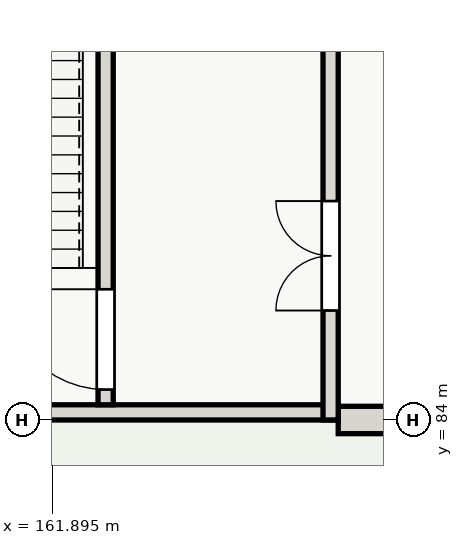
"""IFC4 building model, lengths in metres.
Left out: names, types, materials, properties, quantities, classifications, styles, units other than length and angle.
Written with IfcOpenShell. Run it as: python <this file> out.ifc"""

import sys

from ifc_helpers import new_model, si_unit, direction, frame, frame_2d, origin, place, context, subcontext, project, spatial, rectangle, extrude, element, fill, save


model = new_model("IFC4")
c1 = context("Model", 3, precision=1e-05, world=origin(), true_north=direction((0.0, 1.0)))
c2 = subcontext(c1, "Body", "Model", "MODEL_VIEW")
j1 = project(units=[si_unit("LENGTHUNIT", "METRE"), si_unit("PLANEANGLEUNIT", "RADIAN")], contexts=[c1])
p1 = place(None, origin())
s1 = spatial("IfcSite", under=j1, at=p1, CompositionType="ELEMENT")
p2 = place(p1, origin())
s2 = spatial("IfcBuilding", under=s1, at=p2, CompositionType="ELEMENT")
p3 = place(p2, origin())
s3 = spatial("IfcBuildingStorey", under=s2, at=p3, CompositionType="ELEMENT", Elevation=0.0)
p4 = place(p3, frame((168.0, 84.0, 0.0), z_axis=(0.0, 0.0, 1.0), x_axis=(-1.0, 0.0, 0.0)))
e1 = element("IfcWall", 1, at=p4, inside=s3, PredefinedType="SOLIDWALL", context=c2, shape_type="SweptSolid", body=[
    extrude(rectangle(XDim=1.4, YDim=0.45, at=frame_2d((0.7, 0.0))), origin(), (0.0, 0.0, 1.0), 3.58),
])
p5 = place(p3, frame((166.6, 84.125, 0.0), z_axis=(0.0, 0.0, 1.0), x_axis=(-1.0, 0.0, 0.0)))
e2 = element("IfcWall", 2, at=p5, inside=s3, PredefinedType="SHEAR", context=c2, shape_type="SweptSolid", body=[
    extrude(rectangle(XDim=9.2, YDim=0.25, at=frame_2d((4.6, 0.0))), origin(), (0.0, 0.0, 1.0), 4.2),
])
p6 = place(p5, frame((5.9, 0.0, 0.0)))
e3 = element("IfcOpeningElement", 3, at=p6, cuts=e2, PredefinedType="OPENING", context=c2, shape_type="SweptSolid", body=[
    extrude(rectangle(XDim=1.9, YDim=2.2, at=frame_2d((0.95, 1.1))), frame((0.0, 0.135, 0.0), z_axis=(0.0, -1.0, 0.0), x_axis=(1.0, 0.0, 0.0)), (0.0, 0.0, 1.0), 0.27),
])
p7 = place(p3, frame((166.475, 84.0, 0.0), z_axis=(0.0, 0.0, 1.0), x_axis=(0.0, 1.0, 0.0)))
e4 = element("IfcWall", 4, at=p7, inside=s3, PredefinedType="SHEAR", context=c2, shape_type="SweptSolid", body=[
    extrude(rectangle(XDim=9.2, YDim=0.25, at=frame_2d((4.6, 0.0))), origin(), (0.0, 0.0, 1.0), 4.2),
])
p8 = place(p7, frame((1.8, 0.0, 0.0)))
e5 = element("IfcOpeningElement", 5, at=p8, cuts=e4, PredefinedType="OPENING", context=c2, shape_type="SweptSolid", body=[
    extrude(rectangle(XDim=1.8, YDim=2.15, at=frame_2d((0.9, 1.075))), frame((0.0, 0.135, 0.0), z_axis=(0.0, -1.0, 0.0), x_axis=(1.0, 0.0, 0.0)), (0.0, 0.0, 1.0), 0.27),
])
p9 = place(p3, frame((162.775, 84.25, 0.0), z_axis=(0.0, 0.0, 1.0), x_axis=(0.0, 1.0, 0.0)))
e6 = element("IfcWall", 6, at=p9, inside=s3, PredefinedType="SHEAR", context=c2, shape_type="SweptSolid", body=[
    extrude(rectangle(XDim=8.7, YDim=0.25, at=frame_2d((4.35, 0.0))), origin(), (0.0, 0.0, 1.0), 4.2),
])
p10 = place(p9, frame((0.25, 0.0, 0.0)))
e7 = element("IfcOpeningElement", 7, at=p10, cuts=e6, PredefinedType="OPENING", context=c2, shape_type="SweptSolid", body=[
    extrude(rectangle(XDim=1.65, YDim=2.1, at=frame_2d((0.825, 1.05))), frame((0.0, 0.135, 0.0), z_axis=(0.0, -1.0, 0.0), x_axis=(1.0, 0.0, 0.0)), (0.0, 0.0, 1.0), 0.27),
])
p11 = place(p8, origin())
e8 = element("IfcDoor", 8, at=p11, inside=s3, OperationType="DOUBLE_DOOR_SINGLE_SWING", PredefinedType="DOOR", context=c2, shape_type="SweptSolid", body=[
    extrude(rectangle(XDim=1.8, YDim=2.15, at=frame_2d((0.9, 1.075))), frame((0.0, 0.025, 0.0), z_axis=(0.0, -1.0, 0.0), x_axis=(1.0, 0.0, 0.0)), (0.0, 0.0, 1.0), 0.05),
])
fill(e5, e8)
p12 = place(p10, origin())
e9 = element("IfcDoor", 9, at=p12, inside=s3, OperationType="SINGLE_SWING_RIGHT", PredefinedType="DOOR", context=c2, shape_type="SweptSolid", body=[
    extrude(rectangle(XDim=1.65, YDim=2.1, at=frame_2d((0.825, 1.05))), frame((0.0, 0.025, 0.0), z_axis=(0.0, -1.0, 0.0), x_axis=(1.0, 0.0, 0.0)), (0.0, 0.0, 1.0), 0.05),
])
fill(e7, e9)
save(model, sys.argv[1])
